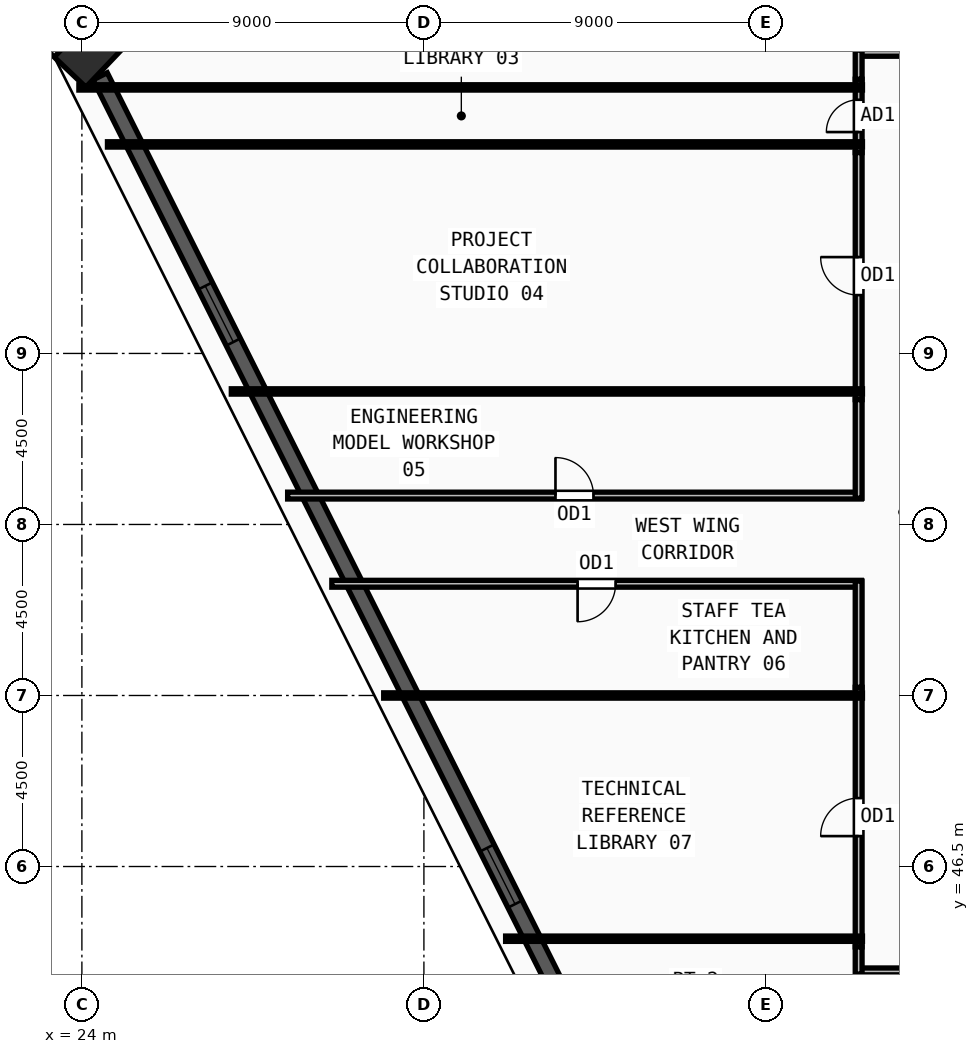
"""IFC4 building model, lengths in metres.
Left out: names, types, materials, properties, quantities, classifications, styles, units other than length and angle.
Written with IfcOpenShell. Run it as: python <this file> out.ifc"""

import sys

from ifc_helpers import new_model, si_unit, direction, frame, frame_2d, origin, origin_2d, place, context, subcontext, project, spatial, rectangle, extrude, source, transform, mapped, element, fill, save


model = new_model("IFC4")
c1 = context("Model", 3, precision=1e-05, world=origin(), true_north=direction((0.0, 1.0)))
c2 = subcontext(c1, "Body", "Model", "MODEL_VIEW")
j1 = project(units=[si_unit("LENGTHUNIT", "METRE"), si_unit("PLANEANGLEUNIT", "RADIAN")], contexts=[c1])
p1 = place(None, origin())
s1 = spatial("IfcSite", under=j1, at=p1, CompositionType="ELEMENT")
p2 = place(p1, origin())
s2 = spatial("IfcBuilding", under=s1, at=p2, CompositionType="ELEMENT")
p3 = place(p2, frame((0.0, 0.0, 135.75)))
s3 = spatial("IfcBuildingStorey", under=s2, at=p3, CompositionType="ELEMENT", Elevation=135.75)
m1 = source(origin(), c2, "Body", "SweptSolid", [
    extrude(rectangle(XDim=1.4, YDim=1.15, at=origin_2d()), origin(), (0.0, 0.0, 1.0), 3.75),
])
p4 = place(p3, frame((24.171, 67.909, 0.0), z_axis=(0.0, 0.0, 1.0), x_axis=(0.68936671806, 0.724412539946, 0.0)))
e1 = element("IfcColumn", 1, at=p4, inside=s3, PredefinedType="COLUMN", context=c2, shape_type="MappedRepresentation", body=[
    mapped(m1, transform((0.0, 0.0, 0.0), x_axis=(1.0, 0.0, 0.0), y_axis=(0.0, 1.0, 0.0), z_axis=(0.0, 0.0, 1.0), scale=1.0)),
])
p5 = place(p3, frame((24.48, 67.292, 0.0), z_axis=(0.0, 0.0, 1.0), x_axis=(0.44812813106, -0.893969338486, 0.0)))
e2 = element("IfcWall", 2, at=p5, inside=s3, PredefinedType="SOLIDWALL", context=c2, shape_type="SweptSolid", body=[
    extrude(rectangle(XDim=31.386, YDim=0.42, at=frame_2d((15.693, 0.0))), origin(), (0.0, 0.0, 1.0), 3.47),
])
m2 = source(origin(), c2, "Body", "SweptSolid", [
    extrude(rectangle(XDim=1.65, YDim=1.95, at=frame_2d((0.825, 0.975))), frame((0.0, 0.22, 0.0), z_axis=(0.0, -1.0, 0.0), x_axis=(1.0, 0.0, 0.0)), (0.0, 0.0, 1.0), 0.44),
])
p6 = place(p5, frame((6.171, 0.0, 0.55)))
e3 = element("IfcOpeningElement", 3, at=p6, cuts=e2, PredefinedType="OPENING", context=c2, shape_type="MappedRepresentation", body=[
    mapped(m2, transform((0.0, 0.0, 0.0), x_axis=(1.0, 0.0, 0.0), y_axis=(0.0, 1.0, 0.0), z_axis=(0.0, 0.0, 1.0), scale=1.0)),
])
p7 = place(p5, frame((22.714, 0.0, 0.55)))
e4 = element("IfcOpeningElement", 4, at=p7, cuts=e2, PredefinedType="OPENING", context=c2, shape_type="MappedRepresentation", body=[
    mapped(m2, transform((0.0, 0.0, 0.0), x_axis=(1.0, 0.0, 0.0), y_axis=(0.0, 1.0, 0.0), z_axis=(0.0, 0.0, 1.0), scale=1.0)),
])
p8 = place(p3, frame((44.37, 67.91, 0.0), z_axis=(0.0, 0.0, 1.0), x_axis=(1.0, 0.0, 0.0)))
e5 = element("IfcWall", 5, at=p8, inside=s3, PredefinedType="PARTITIONING", context=c2, shape_type="SweptSolid", body=[
    extrude(rectangle(XDim=31.26, YDim=0.18, at=frame_2d((15.63, 0.0))), origin(), (0.0, 0.0, 1.0), 3.47),
])
m3 = source(origin(), c2, "Body", "SweptSolid", [
    extrude(rectangle(XDim=1.5, YDim=2.2, at=frame_2d((0.75, 1.1))), frame((0.0, 0.1, 0.0), z_axis=(0.0, -1.0, 0.0), x_axis=(1.0, 0.0, 0.0)), (0.0, 0.0, 1.0), 0.2),
])
p9 = place(p8, frame((14.88, 0.0, 0.0)))
e6 = element("IfcOpeningElement", 6, at=p9, cuts=e5, PredefinedType="OPENING", context=c2, shape_type="MappedRepresentation", body=[
    mapped(m3, transform((0.0, 0.0, 0.0), x_axis=(1.0, 0.0, 0.0), y_axis=(0.0, 1.0, 0.0), z_axis=(0.0, 0.0, 1.0), scale=1.0)),
])
p10 = place(p3, frame((44.44, 65.285, 0.0), z_axis=(0.0, 0.0, 1.0), x_axis=(0.0, 1.0, 0.0)))
e7 = element("IfcWall", 7, at=p10, inside=s3, PredefinedType="PARTITIONING", context=c2, shape_type="SweptSolid", body=[
    extrude(rectangle(XDim=1.93, YDim=0.18, at=frame_2d((0.965, 0.0))), origin(), (0.0, 0.0, 1.0), 3.47),
])
m4 = source(origin(), c2, "Body", "SweptSolid", [
    extrude(rectangle(XDim=0.85, YDim=2.1, at=frame_2d((0.425, 1.05))), frame((0.0, 0.1, 0.0), z_axis=(0.0, -1.0, 0.0), x_axis=(1.0, 0.0, 0.0)), (0.0, 0.0, 1.0), 0.2),
])
p11 = place(p10, frame((0.54, 0.0, 0.0)))
e8 = element("IfcOpeningElement", 8, at=p11, cuts=e7, PredefinedType="OPENING", context=c2, shape_type="MappedRepresentation", body=[
    mapped(m4, transform((0.0, 0.0, 0.0), x_axis=(1.0, 0.0, 0.0), y_axis=(0.0, 1.0, 0.0), z_axis=(0.0, 0.0, 1.0), scale=1.0)),
])
p12 = place(p3, frame((44.44, 58.785, 0.0), z_axis=(0.0, 0.0, 1.0), x_axis=(0.0, 1.0, 0.0)))
e9 = element("IfcWall", 9, at=p12, inside=s3, PredefinedType="PARTITIONING", context=c2, shape_type="SweptSolid", body=[
    extrude(rectangle(XDim=6.5, YDim=0.18, at=frame_2d((3.25, 0.0))), origin(), (0.0, 0.0, 1.0), 3.47),
])
m5 = source(origin(), c2, "Body", "SweptSolid", [
    extrude(rectangle(XDim=1.0, YDim=2.2, at=frame_2d((0.5, 1.1))), frame((0.0, 0.1, 0.0), z_axis=(0.0, -1.0, 0.0), x_axis=(1.0, 0.0, 0.0)), (0.0, 0.0, 1.0), 0.2),
])
p13 = place(p12, frame((2.75, 0.0, 0.0)))
e10 = element("IfcOpeningElement", 10, at=p13, cuts=e9, PredefinedType="OPENING", context=c2, shape_type="MappedRepresentation", body=[
    mapped(m5, transform((0.0, 0.0, 0.0), x_axis=(1.0, 0.0, 0.0), y_axis=(0.0, 1.0, 0.0), z_axis=(0.0, 0.0, 1.0), scale=1.0)),
])
p14 = place(p3, frame((29.414, 56.26, 0.0), z_axis=(0.0, 0.0, 1.0), x_axis=(1.0, 0.0, 0.0)))
e11 = element("IfcWall", 11, at=p14, inside=s3, PredefinedType="PARTITIONING", context=c2, shape_type="SweptSolid", body=[
    extrude(rectangle(XDim=15.096, YDim=0.18, at=frame_2d((7.548, 0.0))), origin(), (0.0, 0.0, 1.0), 3.47),
])
p15 = place(p14, frame((7.048, 0.0, 0.0)))
e12 = element("IfcOpeningElement", 12, at=p15, cuts=e11, PredefinedType="OPENING", context=c2, shape_type="MappedRepresentation", body=[
    mapped(m5, transform((0.0, 0.0, 0.0), x_axis=(1.0, 0.0, 0.0), y_axis=(0.0, 1.0, 0.0), z_axis=(0.0, 0.0, 1.0), scale=1.0)),
])
p16 = place(p3, frame((44.51, 53.94, 0.0), z_axis=(0.0, 0.0, 1.0), x_axis=(-1.0, 0.0, 0.0)))
e13 = element("IfcWall", 13, at=p16, inside=s3, PredefinedType="PARTITIONING", context=c2, shape_type="SweptSolid", body=[
    extrude(rectangle(XDim=13.933, YDim=0.18, at=frame_2d((6.967, 0.0))), origin(), (0.0, 0.0, 1.0), 3.47),
])
p17 = place(p16, frame((6.466, 0.0, 0.0)))
e14 = element("IfcOpeningElement", 14, at=p17, cuts=e13, PredefinedType="OPENING", context=c2, shape_type="MappedRepresentation", body=[
    mapped(m5, transform((0.0, 0.0, 0.0), x_axis=(1.0, 0.0, 0.0), y_axis=(0.0, 1.0, 0.0), z_axis=(0.0, 0.0, 1.0), scale=1.0)),
])
p18 = place(p3, frame((44.44, 44.385, 0.0), z_axis=(0.0, 0.0, 1.0), x_axis=(0.0, 1.0, 0.0)))
e15 = element("IfcWall", 15, at=p18, inside=s3, PredefinedType="PARTITIONING", context=c2, shape_type="SweptSolid", body=[
    extrude(rectangle(XDim=6.83, YDim=0.18, at=frame_2d((3.415, 0.0))), origin(), (0.0, 0.0, 1.0), 3.47),
])
p19 = place(p18, frame((2.915, 0.0, 0.0)))
e16 = element("IfcOpeningElement", 16, at=p19, cuts=e15, PredefinedType="OPENING", context=c2, shape_type="MappedRepresentation", body=[
    mapped(m5, transform((0.0, 0.0, 0.0), x_axis=(1.0, 0.0, 0.0), y_axis=(0.0, 1.0, 0.0), z_axis=(0.0, 0.0, 1.0), scale=1.0)),
])
p20 = place(p3, frame((75.63, 43.74, 0.0), z_axis=(0.0, 0.0, 1.0), x_axis=(-1.0, 0.0, 0.0)))
e17 = element("IfcWall", 17, at=p20, inside=s3, PredefinedType="PARTITIONING", context=c2, shape_type="SweptSolid", body=[
    extrude(rectangle(XDim=31.26, YDim=0.18, at=frame_2d((15.63, 0.0))), origin(), (0.0, 0.0, 1.0), 3.47),
])
p21 = place(p20, frame((10.08, 0.0, 0.0)))
e18 = element("IfcOpeningElement", 18, at=p21, cuts=e17, PredefinedType="OPENING", context=c2, shape_type="MappedRepresentation", body=[
    mapped(m3, transform((0.0, 0.0, 0.0), x_axis=(1.0, 0.0, 0.0), y_axis=(0.0, 1.0, 0.0), z_axis=(0.0, 0.0, 1.0), scale=1.0)),
])
p22 = place(p3, frame((44.44, 67.215, 0.0), z_axis=(0.0, 0.0, 1.0), x_axis=(0.0, 1.0, 0.0)))
e19 = element("IfcWall", 19, at=p22, inside=s3, PredefinedType="PARTITIONING", context=c2, shape_type="SweptSolid", body=[
    extrude(rectangle(XDim=0.765, YDim=0.18, at=frame_2d((0.382, 0.0))), origin(), (0.0, 0.0, 1.0), 3.47),
])
p23 = place(p3, frame((44.44, 56.19, 0.0), z_axis=(0.0, 0.0, 1.0), x_axis=(0.0, 1.0, 0.0)))
e20 = element("IfcWall", 20, at=p23, inside=s3, PredefinedType="PARTITIONING", context=c2, shape_type="SweptSolid", body=[
    extrude(rectangle(XDim=2.595, YDim=0.18, at=frame_2d((1.297, 0.0))), origin(), (0.0, 0.0, 1.0), 3.47),
])
p24 = place(p3, frame((44.44, 51.215, 0.0), z_axis=(0.0, 0.0, 1.0), x_axis=(0.0, 1.0, 0.0)))
e21 = element("IfcWall", 21, at=p24, inside=s3, PredefinedType="PARTITIONING", context=c2, shape_type="SweptSolid", body=[
    extrude(rectangle(XDim=2.795, YDim=0.18, at=frame_2d((1.397, 0.0))), origin(), (0.0, 0.0, 1.0), 3.47),
])
p25 = place(p3, frame((44.44, 43.67, 0.0), z_axis=(0.0, 0.0, 1.0), x_axis=(0.0, 1.0, 0.0)))
e22 = element("IfcWall", 22, at=p25, inside=s3, PredefinedType="PARTITIONING", context=c2, shape_type="SweptSolid", body=[
    extrude(rectangle(XDim=0.715, YDim=0.18, at=frame_2d((0.357, 0.0))), origin(), (0.0, 0.0, 1.0), 3.47),
])
p26 = place(p3, frame((44.54, 44.6, 0.0), z_axis=(0.0, 0.0, 1.0), x_axis=(-1.0, 0.0, 0.0)))
e23 = element("IfcWall", 23, at=p26, inside=s3, PredefinedType="PARTITIONING", context=c2, shape_type="SweptSolid", body=[
    extrude(rectangle(XDim=9.39, YDim=0.14, at=frame_2d((4.695, 0.0))), origin(), (0.0, 0.0, 1.0), 3.47),
])
p27 = place(p3, frame((44.54, 51.0, 0.0), z_axis=(0.0, 0.0, 1.0), x_axis=(-1.0, 0.0, 0.0)))
e24 = element("IfcWall", 24, at=p27, inside=s3, PredefinedType="PARTITIONING", context=c2, shape_type="SweptSolid", body=[
    extrude(rectangle(XDim=12.598, YDim=0.14, at=frame_2d((6.299, 0.0))), origin(), (0.0, 0.0, 1.0), 3.47),
])
p28 = place(p3, frame((44.54, 59.0, 0.0), z_axis=(0.0, 0.0, 1.0), x_axis=(-1.0, 0.0, 0.0)))
e25 = element("IfcWall", 25, at=p28, inside=s3, PredefinedType="PARTITIONING", context=c2, shape_type="SweptSolid", body=[
    extrude(rectangle(XDim=16.608, YDim=0.14, at=frame_2d((8.304, 0.0))), origin(), (0.0, 0.0, 1.0), 3.47),
])
p29 = place(p3, frame((44.54, 65.5, 0.0), z_axis=(0.0, 0.0, 1.0), x_axis=(-1.0, 0.0, 0.0)))
e26 = element("IfcWall", 26, at=p29, inside=s3, PredefinedType="PARTITIONING", context=c2, shape_type="SweptSolid", body=[
    extrude(rectangle(XDim=19.867, YDim=0.14, at=frame_2d((9.934, 0.0))), origin(), (0.0, 0.0, 1.0), 2.655),
])
p30 = place(p3, frame((44.54, 67.0, 0.0), z_axis=(0.0, 0.0, 1.0), x_axis=(-1.0, 0.0, 0.0)))
e27 = element("IfcWall", 27, at=p30, inside=s3, PredefinedType="PARTITIONING", context=c2, shape_type="SweptSolid", body=[
    extrude(rectangle(XDim=20.619, YDim=0.14, at=frame_2d((10.31, 0.0))), origin(), (0.0, 0.0, 1.0), 2.655),
])
m6 = source(origin(), c2, "Body", "SweptSolid", [
    extrude(rectangle(XDim=1.65, YDim=1.95, at=frame_2d((0.825, 0.975))), frame((0.0, 0.03, 0.0), z_axis=(0.0, -1.0, 0.0), x_axis=(1.0, 0.0, 0.0)), (0.0, 0.0, 1.0), 0.06),
])
p31 = place(p6, origin())
e28 = element("IfcWindow", 28, at=p31, inside=s3, PartitioningType="DOUBLE_PANEL_VERTICAL", PredefinedType="WINDOW", context=c2, shape_type="MappedRepresentation", body=[
    mapped(m6, transform((0.0, 0.0, 0.0), x_axis=(1.0, 0.0, 0.0), y_axis=(0.0, 1.0, 0.0), z_axis=(0.0, 0.0, 1.0), scale=1.0)),
])
fill(e3, e28)
p32 = place(p7, origin())
e29 = element("IfcWindow", 29, at=p32, inside=s3, PartitioningType="DOUBLE_PANEL_VERTICAL", PredefinedType="WINDOW", context=c2, shape_type="MappedRepresentation", body=[
    mapped(m6, transform((0.0, 0.0, 0.0), x_axis=(1.0, 0.0, 0.0), y_axis=(0.0, 1.0, 0.0), z_axis=(0.0, 0.0, 1.0), scale=1.0)),
])
fill(e4, e29)
m7 = source(origin(), c2, "Body", "SweptSolid", [
    extrude(rectangle(XDim=0.85, YDim=2.1, at=frame_2d((0.425, 1.05))), frame((0.0, 0.025, 0.0), z_axis=(0.0, -1.0, 0.0), x_axis=(1.0, 0.0, 0.0)), (0.0, 0.0, 1.0), 0.05),
])
p33 = place(p11, origin())
e30 = element("IfcDoor", 30, at=p33, inside=s3, OperationType="SINGLE_SWING_LEFT", PredefinedType="DOOR", context=c2, shape_type="MappedRepresentation", body=[
    mapped(m7, transform((0.0, 0.0, 0.0), x_axis=(1.0, 0.0, 0.0), y_axis=(0.0, 1.0, 0.0), z_axis=(0.0, 0.0, 1.0), scale=1.0)),
])
fill(e8, e30)
m8 = source(origin(), c2, "Body", "SweptSolid", [
    extrude(rectangle(XDim=1.0, YDim=2.2, at=frame_2d((0.5, 1.1))), frame((0.0, 0.025, 0.0), z_axis=(0.0, -1.0, 0.0), x_axis=(1.0, 0.0, 0.0)), (0.0, 0.0, 1.0), 0.05),
])
p34 = place(p13, origin())
e31 = element("IfcDoor", 31, at=p34, inside=s3, OperationType="SINGLE_SWING_RIGHT", PredefinedType="DOOR", context=c2, shape_type="MappedRepresentation", body=[
    mapped(m8, transform((0.0, 0.0, 0.0), x_axis=(1.0, 0.0, 0.0), y_axis=(0.0, 1.0, 0.0), z_axis=(0.0, 0.0, 1.0), scale=1.0)),
])
fill(e10, e31)
p35 = place(p15, origin())
e32 = element("IfcDoor", 32, at=p35, inside=s3, OperationType="SINGLE_SWING_LEFT", PredefinedType="DOOR", context=c2, shape_type="MappedRepresentation", body=[
    mapped(m8, transform((0.0, 0.0, 0.0), x_axis=(1.0, 0.0, 0.0), y_axis=(0.0, 1.0, 0.0), z_axis=(0.0, 0.0, 1.0), scale=1.0)),
])
fill(e12, e32)
p36 = place(p17, origin())
e33 = element("IfcDoor", 33, at=p36, inside=s3, OperationType="SINGLE_SWING_RIGHT", PredefinedType="DOOR", context=c2, shape_type="MappedRepresentation", body=[
    mapped(m8, transform((0.0, 0.0, 0.0), x_axis=(1.0, 0.0, 0.0), y_axis=(0.0, 1.0, 0.0), z_axis=(0.0, 0.0, 1.0), scale=1.0)),
])
fill(e14, e33)
p37 = place(p19, origin())
e34 = element("IfcDoor", 34, at=p37, inside=s3, OperationType="SINGLE_SWING_LEFT", PredefinedType="DOOR", context=c2, shape_type="MappedRepresentation", body=[
    mapped(m8, transform((0.0, 0.0, 0.0), x_axis=(1.0, 0.0, 0.0), y_axis=(0.0, 1.0, 0.0), z_axis=(0.0, 0.0, 1.0), scale=1.0)),
])
fill(e16, e34)
save(model, sys.argv[1])
